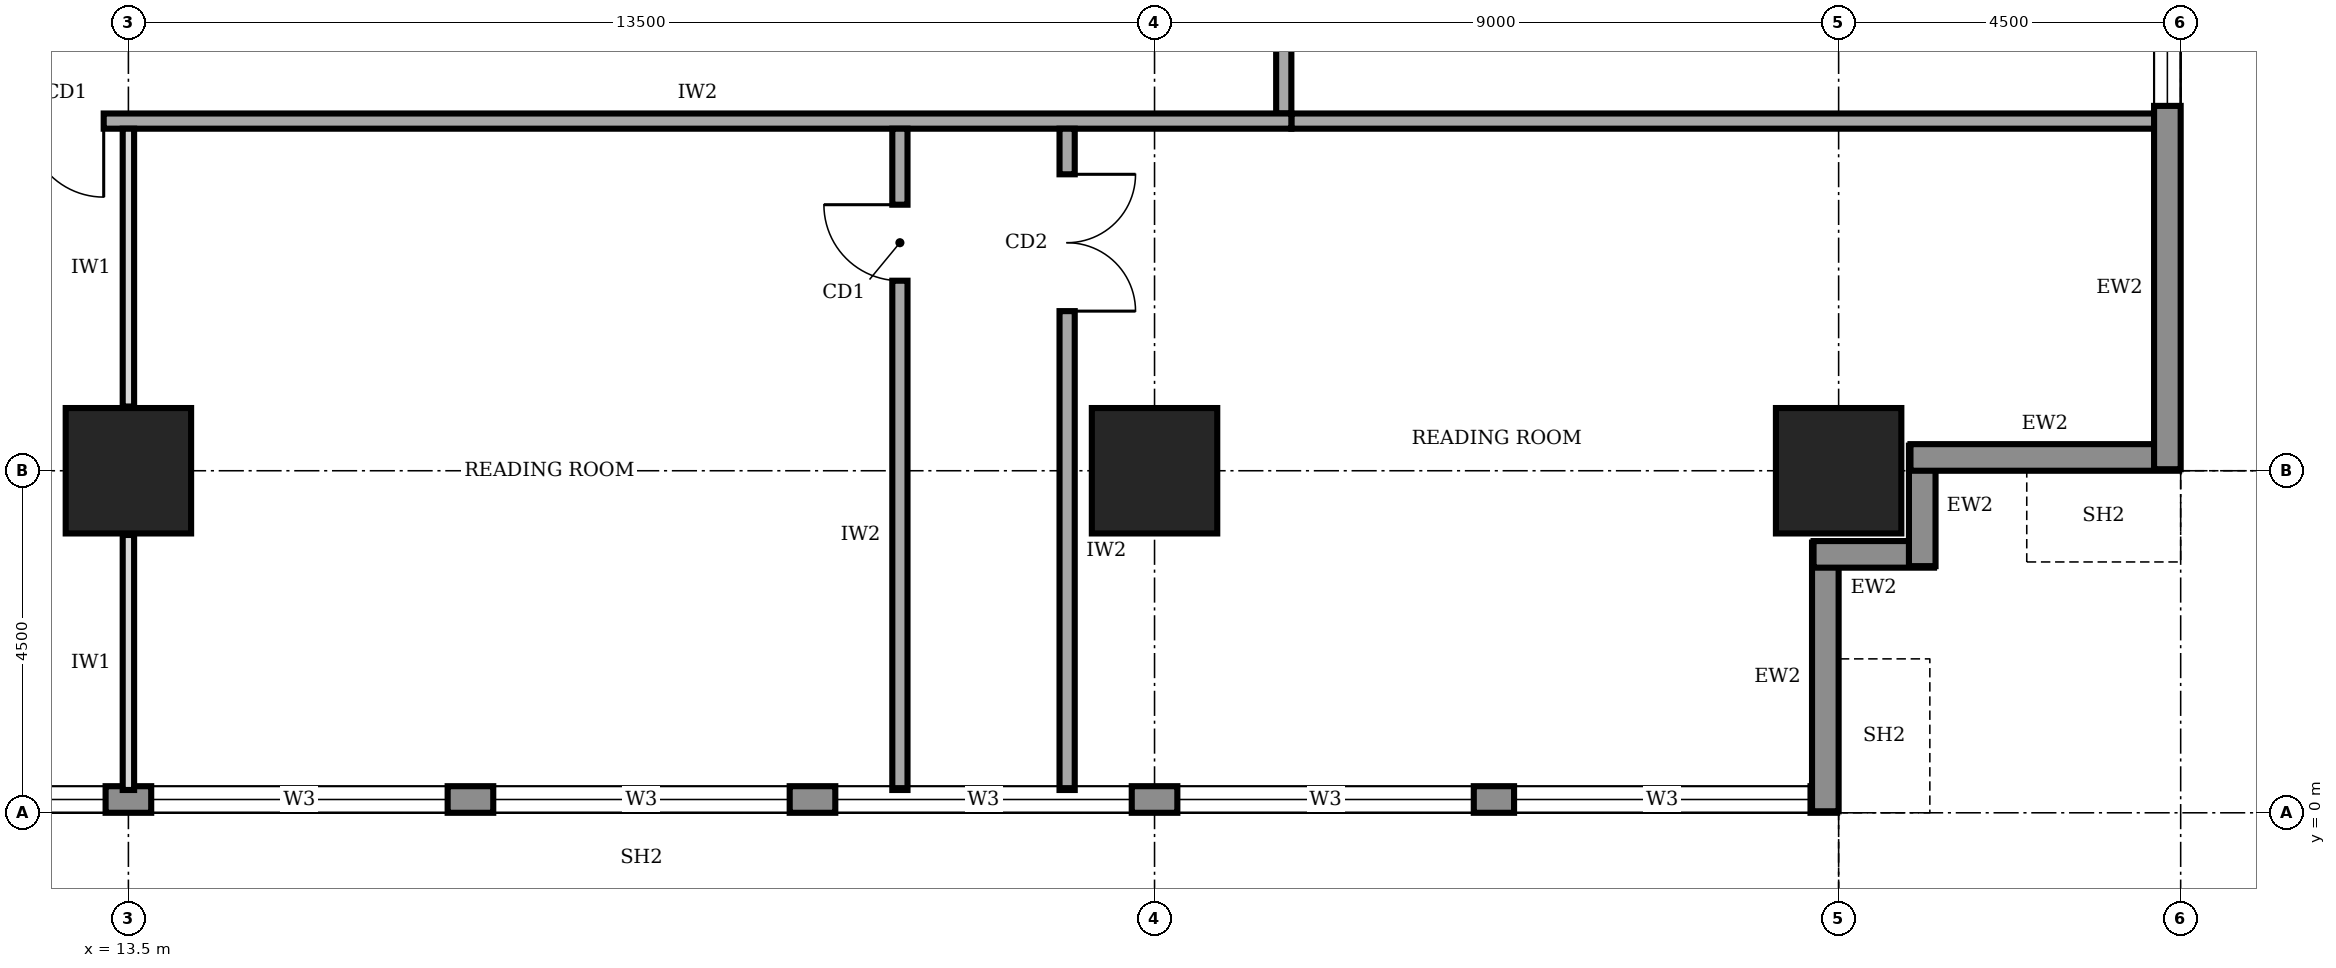
"""IFC4 building model, lengths in metres.
Left out: names, types, materials, properties, quantities, classifications, styles, units other than length and angle.
Written with IfcOpenShell. Run it as: python <this file> out.ifc"""

import sys

from ifc_helpers import new_model, si_unit, direction, frame, frame_2d, origin, origin_2d, place, context, subcontext, project, spatial, rectangle, extrude, element, fill, save


model = new_model("IFC4")
c1 = context("Model", 3, precision=1e-05, world=origin(), true_north=direction((0.0, 1.0)))
c2 = subcontext(c1, "Body", "Model", "MODEL_VIEW")
j1 = project(units=[si_unit("LENGTHUNIT", "METRE"), si_unit("PLANEANGLEUNIT", "RADIAN")], contexts=[c1])
p1 = place(None, origin())
s1 = spatial("IfcSite", under=j1, at=p1, CompositionType="ELEMENT")
p2 = place(p1, origin())
s2 = spatial("IfcBuilding", under=s1, at=p2, CompositionType="ELEMENT")
p3 = place(p2, frame((0.0, 0.0, 201.0)))
s3 = spatial("IfcBuildingStorey", under=s2, at=p3, CompositionType="ELEMENT", Elevation=201.0)
for number, where, z_axis, x_axis in (
    (1, (13.5, 4.5, 0.0), (0.0, 0.0, 1.0), (1.0, 0.0, 0.0)),
    (2, (27.0, 4.5, 0.0), (0.0, 0.0, 1.0), (1.0, 0.0, 0.0)),
    (3, (36.0, 4.5, 0.0), (0.0, 0.0, 1.0), (1.0, 0.0, 0.0)),
):
    element("IfcColumn", number, at=place(p3, frame(where, z_axis=z_axis, x_axis=x_axis)), inside=s3, PredefinedType="COLUMN", context=c2, shape_type="SweptSolid", body=[
        extrude(rectangle(XDim=1.65, YDim=1.65, at=origin_2d()), origin(), (0.0, 0.0, 1.0), 4.0),
    ])
p4 = place(p3, frame((4.52, 0.175, 0.0), z_axis=(0.0, 0.0, 1.0), x_axis=(1.0, 0.0, 0.0)))
e4 = element("IfcWall", 4, at=p4, inside=s3, PredefinedType="STANDARD", context=c2, shape_type="SweptSolid", body=[
    extrude(rectangle(XDim=31.46, YDim=0.35, at=frame_2d((15.73, 0.0))), origin(), (0.0, 0.0, 1.0), 3.75),
])
p5 = place(p4, frame((4.78, 0.0, 0.95)))
e5 = element("IfcOpeningElement", 5, at=p5, cuts=e4, PredefinedType="OPENING", context=c2, shape_type="SweptSolid", body=[
    extrude(rectangle(XDim=3.9, YDim=1.8, at=frame_2d((1.95, 0.9))), frame((0.0, 0.185, 0.0), z_axis=(0.0, -1.0, 0.0), x_axis=(1.0, 0.0, 0.0)), (0.0, 0.0, 1.0), 0.37),
])
p6 = place(p4, frame((9.28, 0.0, 0.95)))
e6 = element("IfcOpeningElement", 6, at=p6, cuts=e4, PredefinedType="OPENING", context=c2, shape_type="SweptSolid", body=[
    extrude(rectangle(XDim=3.9, YDim=1.8, at=frame_2d((1.95, 0.9))), frame((0.0, 0.185, 0.0), z_axis=(0.0, -1.0, 0.0), x_axis=(1.0, 0.0, 0.0)), (0.0, 0.0, 1.0), 0.37),
])
p7 = place(p4, frame((13.78, 0.0, 0.95)))
e7 = element("IfcOpeningElement", 7, at=p7, cuts=e4, PredefinedType="OPENING", context=c2, shape_type="SweptSolid", body=[
    extrude(rectangle(XDim=3.9, YDim=1.8, at=frame_2d((1.95, 0.9))), frame((0.0, 0.185, 0.0), z_axis=(0.0, -1.0, 0.0), x_axis=(1.0, 0.0, 0.0)), (0.0, 0.0, 1.0), 0.37),
])
p8 = place(p4, frame((18.28, 0.0, 0.95)))
e8 = element("IfcOpeningElement", 8, at=p8, cuts=e4, PredefinedType="OPENING", context=c2, shape_type="SweptSolid", body=[
    extrude(rectangle(XDim=3.9, YDim=1.8, at=frame_2d((1.95, 0.9))), frame((0.0, 0.185, 0.0), z_axis=(0.0, -1.0, 0.0), x_axis=(1.0, 0.0, 0.0)), (0.0, 0.0, 1.0), 0.37),
])
p9 = place(p4, frame((22.78, 0.0, 0.95)))
e9 = element("IfcOpeningElement", 9, at=p9, cuts=e4, PredefinedType="OPENING", context=c2, shape_type="SweptSolid", body=[
    extrude(rectangle(XDim=3.9, YDim=1.8, at=frame_2d((1.95, 0.9))), frame((0.0, 0.185, 0.0), z_axis=(0.0, -1.0, 0.0), x_axis=(1.0, 0.0, 0.0)), (0.0, 0.0, 1.0), 0.37),
])
p10 = place(p4, frame((27.21, 0.0, 0.95)))
e10 = element("IfcOpeningElement", 10, at=p10, cuts=e4, PredefinedType="OPENING", context=c2, shape_type="SweptSolid", body=[
    extrude(rectangle(XDim=3.9, YDim=1.8, at=frame_2d((1.95, 0.9))), frame((0.0, 0.185, 0.0), z_axis=(0.0, -1.0, 0.0), x_axis=(1.0, 0.0, 0.0)), (0.0, 0.0, 1.0), 0.37),
])
p11 = place(p3, frame((35.825, 0.02, 0.0), z_axis=(0.0, 0.0, 1.0), x_axis=(0.0, 1.0, 0.0)))
e11 = element("IfcWall", 11, at=p11, inside=s3, PredefinedType="STANDARD", context=c2, shape_type="SweptSolid", body=[
    extrude(rectangle(XDim=3.535, YDim=0.35, at=frame_2d((1.768, 0.0))), origin(), (0.0, 0.0, 1.0), 2.85),
])
for number, where, z_axis, x_axis in (
    (12, (35.67, 3.4, 0.0), (0.0, 0.0, 1.0), (1.0, 0.0, 0.0)),
    (13, (37.1, 3.245, 0.0), (0.0, 0.0, 1.0), (0.0, 1.0, 0.0)),
):
    element("IfcWall", number, at=place(p3, frame(where, z_axis=z_axis, x_axis=x_axis)), inside=s3, PredefinedType="STANDARD", context=c2, shape_type="SweptSolid", body=[
        extrude(rectangle(XDim=1.585, YDim=0.35, at=frame_2d((0.792, 0.0))), origin(), (0.0, 0.0, 1.0), 3.75),
    ])
p12 = place(p3, frame((36.945, 4.675, 0.0), z_axis=(0.0, 0.0, 1.0), x_axis=(1.0, 0.0, 0.0)))
e14 = element("IfcWall", 14, at=p12, inside=s3, PredefinedType="STANDARD", context=c2, shape_type="SweptSolid", body=[
    extrude(rectangle(XDim=3.535, YDim=0.35, at=frame_2d((1.768, 0.0))), origin(), (0.0, 0.0, 1.0), 2.85),
])
p13 = place(p3, frame((40.325, 4.52, 0.0), z_axis=(0.0, 0.0, 1.0), x_axis=(0.0, 1.0, 0.0)))
e15 = element("IfcWall", 15, at=p13, inside=s3, PredefinedType="STANDARD", context=c2, shape_type="SweptSolid", body=[
    extrude(rectangle(XDim=31.46, YDim=0.35, at=frame_2d((15.73, 0.0))), origin(), (0.0, 0.0, 1.0), 3.75),
])
p14 = place(p13, frame((4.78, 0.0, 0.95)))
e16 = element("IfcOpeningElement", 16, at=p14, cuts=e15, PredefinedType="OPENING", context=c2, shape_type="SweptSolid", body=[
    extrude(rectangle(XDim=3.9, YDim=1.8, at=frame_2d((1.95, 0.9))), frame((0.0, 0.185, 0.0), z_axis=(0.0, -1.0, 0.0), x_axis=(1.0, 0.0, 0.0)), (0.0, 0.0, 1.0), 0.37),
])
p15 = place(p13, frame((9.28, 0.0, 0.95)))
e17 = element("IfcOpeningElement", 17, at=p15, cuts=e15, PredefinedType="OPENING", context=c2, shape_type="SweptSolid", body=[
    extrude(rectangle(XDim=3.9, YDim=1.8, at=frame_2d((1.95, 0.9))), frame((0.0, 0.185, 0.0), z_axis=(0.0, -1.0, 0.0), x_axis=(1.0, 0.0, 0.0)), (0.0, 0.0, 1.0), 0.37),
])
p16 = place(p13, frame((13.78, 0.0, 0.95)))
e18 = element("IfcOpeningElement", 18, at=p16, cuts=e15, PredefinedType="OPENING", context=c2, shape_type="SweptSolid", body=[
    extrude(rectangle(XDim=3.9, YDim=1.8, at=frame_2d((1.95, 0.9))), frame((0.0, 0.185, 0.0), z_axis=(0.0, -1.0, 0.0), x_axis=(1.0, 0.0, 0.0)), (0.0, 0.0, 1.0), 0.37),
])
p17 = place(p13, frame((18.28, 0.0, 0.95)))
e19 = element("IfcOpeningElement", 19, at=p17, cuts=e15, PredefinedType="OPENING", context=c2, shape_type="SweptSolid", body=[
    extrude(rectangle(XDim=3.9, YDim=1.8, at=frame_2d((1.95, 0.9))), frame((0.0, 0.185, 0.0), z_axis=(0.0, -1.0, 0.0), x_axis=(1.0, 0.0, 0.0)), (0.0, 0.0, 1.0), 0.37),
])
p18 = place(p13, frame((22.78, 0.0, 0.95)))
e20 = element("IfcOpeningElement", 20, at=p18, cuts=e15, PredefinedType="OPENING", context=c2, shape_type="SweptSolid", body=[
    extrude(rectangle(XDim=3.9, YDim=1.8, at=frame_2d((1.95, 0.9))), frame((0.0, 0.185, 0.0), z_axis=(0.0, -1.0, 0.0), x_axis=(1.0, 0.0, 0.0)), (0.0, 0.0, 1.0), 0.37),
])
p19 = place(p13, frame((27.21, 0.0, 0.95)))
e21 = element("IfcOpeningElement", 21, at=p19, cuts=e15, PredefinedType="OPENING", context=c2, shape_type="SweptSolid", body=[
    extrude(rectangle(XDim=3.9, YDim=1.8, at=frame_2d((1.95, 0.9))), frame((0.0, 0.185, 0.0), z_axis=(0.0, -1.0, 0.0), x_axis=(1.0, 0.0, 0.0)), (0.0, 0.0, 1.0), 0.37),
])
p20 = place(p3, frame((11.9, 9.1, 0.0), z_axis=(0.0, 0.0, 1.0), x_axis=(1.0, 0.0, 0.0)))
e22 = element("IfcWall", 22, at=p20, inside=s3, PredefinedType="SOLIDWALL", context=c2, shape_type="SweptSolid", body=[
    extrude(rectangle(XDim=16.9, YDim=0.2, at=frame_2d((8.45, 0.0))), origin(), (0.0, 0.0, 1.0), 3.75),
])
p21 = place(p20, frame((0.275, 0.0, 0.0)))
e23 = element("IfcOpeningElement", 23, at=p21, cuts=e22, PredefinedType="OPENING", context=c2, shape_type="SweptSolid", body=[
    extrude(rectangle(XDim=1.0, YDim=2.1, at=frame_2d((0.5, 1.05))), frame((0.0, 0.11, 0.0), z_axis=(0.0, -1.0, 0.0), x_axis=(1.0, 0.0, 0.0)), (0.0, 0.0, 1.0), 0.22),
])
p22 = place(p3, frame((28.7, 9.2, 0.0), z_axis=(0.0, 0.0, 1.0), x_axis=(0.0, 1.0, 0.0)))
e24 = element("IfcWall", 24, at=p22, inside=s3, PredefinedType="SOLIDWALL", context=c2, shape_type="SweptSolid", body=[
    extrude(rectangle(XDim=23.8, YDim=0.2, at=frame_2d((11.9, 0.0))), origin(), (0.0, 0.0, 1.0), 3.75),
])
p23 = place(p22, frame((3.4, 0.0, 0.0)))
e25 = element("IfcOpeningElement", 25, at=p23, cuts=e24, PredefinedType="OPENING", context=c2, shape_type="SweptSolid", body=[
    extrude(rectangle(XDim=1.8, YDim=2.1, at=frame_2d((0.9, 1.05))), frame((0.0, 0.11, 0.0), z_axis=(0.0, -1.0, 0.0), x_axis=(1.0, 0.0, 0.0)), (0.0, 0.0, 1.0), 0.22),
])
p24 = place(p22, frame((10.55, 0.0, 0.0)))
e26 = element("IfcOpeningElement", 26, at=p24, cuts=e24, PredefinedType="OPENING", context=c2, shape_type="SweptSolid", body=[
    extrude(rectangle(XDim=1.0, YDim=2.1, at=frame_2d((0.5, 1.05))), frame((0.0, 0.11, 0.0), z_axis=(0.0, -1.0, 0.0), x_axis=(1.0, 0.0, 0.0)), (0.0, 0.0, 1.0), 0.22),
])
p25 = place(p22, frame((17.65, 0.0, 0.0)))
e27 = element("IfcOpeningElement", 27, at=p25, cuts=e24, PredefinedType="OPENING", context=c2, shape_type="SweptSolid", body=[
    extrude(rectangle(XDim=1.8, YDim=2.1, at=frame_2d((0.9, 1.05))), frame((0.0, 0.11, 0.0), z_axis=(0.0, -1.0, 0.0), x_axis=(1.0, 0.0, 0.0)), (0.0, 0.0, 1.0), 0.22),
])
p26 = place(p3, frame((23.65, 0.3, 0.0), z_axis=(0.0, 0.0, 1.0), x_axis=(0.0, 1.0, 0.0)))
e28 = element("IfcWall", 28, at=p26, inside=s3, PredefinedType="SOLIDWALL", context=c2, shape_type="SweptSolid", body=[
    extrude(rectangle(XDim=8.7, YDim=0.2, at=frame_2d((4.35, 0.0))), origin(), (0.0, 0.0, 1.0), 3.75),
])
p27 = place(p26, frame((6.7, 0.0, 0.0)))
e29 = element("IfcOpeningElement", 29, at=p27, cuts=e28, PredefinedType="OPENING", context=c2, shape_type="SweptSolid", body=[
    extrude(rectangle(XDim=1.0, YDim=2.1, at=frame_2d((0.5, 1.05))), frame((0.0, 0.11, 0.0), z_axis=(0.0, -1.0, 0.0), x_axis=(1.0, 0.0, 0.0)), (0.0, 0.0, 1.0), 0.22),
])
p28 = place(p3, frame((25.85, 9.0, 0.0), z_axis=(0.0, 0.0, 1.0), x_axis=(0.0, -1.0, 0.0)))
e30 = element("IfcWall", 30, at=p28, inside=s3, PredefinedType="SOLIDWALL", context=c2, shape_type="SweptSolid", body=[
    extrude(rectangle(XDim=8.7, YDim=0.2, at=frame_2d((4.35, 0.0))), origin(), (0.0, 0.0, 1.0), 3.75),
])
p29 = place(p28, frame((0.6, 0.0, 0.0)))
e31 = element("IfcOpeningElement", 31, at=p29, cuts=e30, PredefinedType="OPENING", context=c2, shape_type="SweptSolid", body=[
    extrude(rectangle(XDim=1.8, YDim=2.1, at=frame_2d((0.9, 1.05))), frame((0.0, 0.11, 0.0), z_axis=(0.0, -1.0, 0.0), x_axis=(1.0, 0.0, 0.0)), (0.0, 0.0, 1.0), 0.22),
])
p30 = place(p3, frame((28.8, 9.1, 0.0), z_axis=(0.0, 0.0, 1.0), x_axis=(1.0, 0.0, 0.0)))
e32 = element("IfcWall", 32, at=p30, inside=s3, PredefinedType="SOLIDWALL", context=c2, shape_type="SweptSolid", body=[
    extrude(rectangle(XDim=11.4, YDim=0.2, at=frame_2d((5.7, 0.0))), origin(), (0.0, 0.0, 1.0), 3.75),
])
p31 = place(p3, frame((13.5, 0.3, 0.0), z_axis=(0.0, 0.0, 1.0), x_axis=(0.0, 1.0, 0.0)))
e33 = element("IfcWall", 33, at=p31, inside=s3, PredefinedType="PARTITIONING", context=c2, shape_type="SweptSolid", body=[
    extrude(rectangle(XDim=3.355, YDim=0.15, at=frame_2d((1.677, 0.0))), origin(), (0.0, 0.0, 1.0), 2.85),
])
p32 = place(p3, frame((13.5, 5.345, 0.0), z_axis=(0.0, 0.0, 1.0), x_axis=(0.0, 1.0, 0.0)))
e34 = element("IfcWall", 34, at=p32, inside=s3, PredefinedType="PARTITIONING", context=c2, shape_type="SweptSolid", body=[
    extrude(rectangle(XDim=3.655, YDim=0.15, at=frame_2d((1.828, 0.0))), origin(), (0.0, 0.0, 1.0), 2.85),
])
p33 = place(p5, origin())
e35 = element("IfcWindow", 35, at=p33, inside=s3, PartitioningType="SINGLE_PANEL", PredefinedType="WINDOW", context=c2, shape_type="SweptSolid", body=[
    extrude(rectangle(XDim=3.9, YDim=1.8, at=frame_2d((1.95, 0.9))), frame((0.0, 0.03, 0.0), z_axis=(0.0, -1.0, 0.0), x_axis=(1.0, 0.0, 0.0)), (0.0, 0.0, 1.0), 0.06),
])
fill(e5, e35)
p34 = place(p6, origin())
e36 = element("IfcWindow", 36, at=p34, inside=s3, PartitioningType="SINGLE_PANEL", PredefinedType="WINDOW", context=c2, shape_type="SweptSolid", body=[
    extrude(rectangle(XDim=3.9, YDim=1.8, at=frame_2d((1.95, 0.9))), frame((0.0, 0.03, 0.0), z_axis=(0.0, -1.0, 0.0), x_axis=(1.0, 0.0, 0.0)), (0.0, 0.0, 1.0), 0.06),
])
fill(e6, e36)
p35 = place(p7, origin())
e37 = element("IfcWindow", 37, at=p35, inside=s3, PartitioningType="SINGLE_PANEL", PredefinedType="WINDOW", context=c2, shape_type="SweptSolid", body=[
    extrude(rectangle(XDim=3.9, YDim=1.8, at=frame_2d((1.95, 0.9))), frame((0.0, 0.03, 0.0), z_axis=(0.0, -1.0, 0.0), x_axis=(1.0, 0.0, 0.0)), (0.0, 0.0, 1.0), 0.06),
])
fill(e7, e37)
p36 = place(p8, origin())
e38 = element("IfcWindow", 38, at=p36, inside=s3, PartitioningType="SINGLE_PANEL", PredefinedType="WINDOW", context=c2, shape_type="SweptSolid", body=[
    extrude(rectangle(XDim=3.9, YDim=1.8, at=frame_2d((1.95, 0.9))), frame((0.0, 0.03, 0.0), z_axis=(0.0, -1.0, 0.0), x_axis=(1.0, 0.0, 0.0)), (0.0, 0.0, 1.0), 0.06),
])
fill(e8, e38)
p37 = place(p9, origin())
e39 = element("IfcWindow", 39, at=p37, inside=s3, PartitioningType="SINGLE_PANEL", PredefinedType="WINDOW", context=c2, shape_type="SweptSolid", body=[
    extrude(rectangle(XDim=3.9, YDim=1.8, at=frame_2d((1.95, 0.9))), frame((0.0, 0.03, 0.0), z_axis=(0.0, -1.0, 0.0), x_axis=(1.0, 0.0, 0.0)), (0.0, 0.0, 1.0), 0.06),
])
fill(e9, e39)
p38 = place(p10, origin())
e40 = element("IfcWindow", 40, at=p38, inside=s3, PartitioningType="SINGLE_PANEL", PredefinedType="WINDOW", context=c2, shape_type="SweptSolid", body=[
    extrude(rectangle(XDim=3.9, YDim=1.8, at=frame_2d((1.95, 0.9))), frame((0.0, 0.03, 0.0), z_axis=(0.0, -1.0, 0.0), x_axis=(1.0, 0.0, 0.0)), (0.0, 0.0, 1.0), 0.06),
])
fill(e10, e40)
p39 = place(p14, origin())
e41 = element("IfcWindow", 41, at=p39, inside=s3, PartitioningType="SINGLE_PANEL", PredefinedType="WINDOW", context=c2, shape_type="SweptSolid", body=[
    extrude(rectangle(XDim=3.9, YDim=1.8, at=frame_2d((1.95, 0.9))), frame((0.0, 0.03, 0.0), z_axis=(0.0, -1.0, 0.0), x_axis=(1.0, 0.0, 0.0)), (0.0, 0.0, 1.0), 0.06),
])
fill(e16, e41)
p40 = place(p21, frame((1.0, 0.0, 0.0), z_axis=(0.0, 0.0, 1.0), x_axis=(-1.0, 0.0, 0.0)))
e42 = element("IfcDoor", 42, at=p40, inside=s3, OperationType="SINGLE_SWING_LEFT", PredefinedType="DOOR", context=c2, shape_type="SweptSolid", body=[
    extrude(rectangle(XDim=1.0, YDim=2.1, at=frame_2d((0.5, 1.05))), frame((0.0, 0.025, 0.0), z_axis=(0.0, -1.0, 0.0), x_axis=(1.0, 0.0, 0.0)), (0.0, 0.0, 1.0), 0.05),
])
fill(e23, e42)
p41 = place(p27, origin())
e43 = element("IfcDoor", 43, at=p41, inside=s3, OperationType="SINGLE_SWING_RIGHT", PredefinedType="DOOR", context=c2, shape_type="SweptSolid", body=[
    extrude(rectangle(XDim=1.0, YDim=2.1, at=frame_2d((0.5, 1.05))), frame((0.0, 0.025, 0.0), z_axis=(0.0, -1.0, 0.0), x_axis=(1.0, 0.0, 0.0)), (0.0, 0.0, 1.0), 0.05),
])
fill(e29, e43)
p42 = place(p29, origin())
e44 = element("IfcDoor", 44, at=p42, inside=s3, OperationType="DOUBLE_DOOR_SINGLE_SWING", PredefinedType="DOOR", context=c2, shape_type="SweptSolid", body=[
    extrude(rectangle(XDim=1.8, YDim=2.1, at=frame_2d((0.9, 1.05))), frame((0.0, 0.025, 0.0), z_axis=(0.0, -1.0, 0.0), x_axis=(1.0, 0.0, 0.0)), (0.0, 0.0, 1.0), 0.05),
])
fill(e31, e44)
save(model, sys.argv[1])
